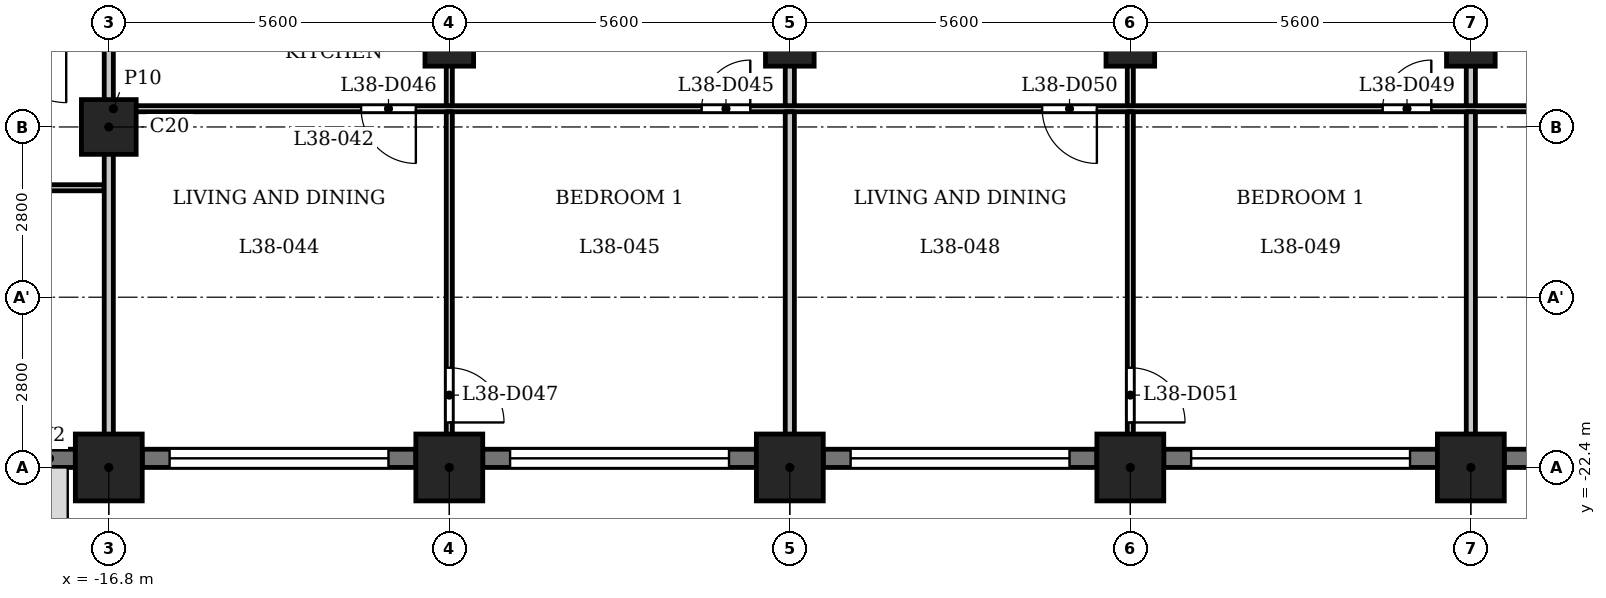
"""IFC4 building model, lengths in metres.
Left out: names, types, materials, properties, quantities, classifications, styles, units other than length and angle.
Written with IfcOpenShell. Run it as: python <this file> out.ifc"""

import sys

from ifc_helpers import new_model, si_unit, direction, frame, frame_2d, origin, origin_2d, place, context, subcontext, project, spatial, rectangle, extrude, element, fill, save


model = new_model("IFC4")
c1 = context("Model", 3, precision=1e-05, world=origin(), true_north=direction((0.0, 1.0)))
c2 = subcontext(c1, "Body", "Model", "MODEL_VIEW")
j1 = project(units=[si_unit("LENGTHUNIT", "METRE"), si_unit("PLANEANGLEUNIT", "RADIAN")], contexts=[c1])
p1 = place(None, origin())
s1 = spatial("IfcSite", under=j1, at=p1, CompositionType="ELEMENT")
p2 = place(p1, origin())
s2 = spatial("IfcBuilding", under=s1, at=p2, CompositionType="ELEMENT")
p3 = place(p2, frame((0.0, 0.0, 150.1)))
s3 = spatial("IfcBuildingStorey", under=s2, at=p3, CompositionType="ELEMENT", Elevation=150.1)
for number, where, z_axis, x_axis in (
    (1, (-16.8, -22.4, 0.0), (0.0, 0.0, 1.0), (1.0, 0.0, 0.0)),
    (2, (-11.2, -22.4, 0.0), (0.0, 0.0, 1.0), (1.0, 0.0, 0.0)),
    (3, (-5.6, -22.4, 0.0), (0.0, 0.0, 1.0), (1.0, 0.0, 0.0)),
    (4, (0.0, -22.4, 0.0), (0.0, 0.0, 1.0), (1.0, 0.0, 0.0)),
    (5, (5.6, -22.4, 0.0), (0.0, 0.0, 1.0), (1.0, 0.0, 0.0)),
):
    element("IfcColumn", number, at=place(p3, frame(where, z_axis=z_axis, x_axis=x_axis)), inside=s3, PredefinedType="COLUMN", context=c2, shape_type="SweptSolid", body=[
        extrude(rectangle(XDim=1.1, YDim=1.1, at=origin_2d()), origin(), (0.0, 0.0, 1.0), 3.5),
    ])
p4 = place(p3, frame((-16.8, -16.8, 0.0), z_axis=(0.0, 0.0, 1.0), x_axis=(1.0, 0.0, 0.0)))
e6 = element("IfcColumn", 6, at=p4, inside=s3, PredefinedType="COLUMN", context=c2, shape_type="SweptSolid", body=[
    extrude(rectangle(XDim=0.9, YDim=0.9, at=origin_2d()), origin(), (0.0, 0.0, 1.0), 3.5),
])
for number, where, z_axis, x_axis in (
    (7, (-11.2, -15.4, 0.0), (0.0, 0.0, 1.0), (1.0, 0.0, 0.0)),
    (8, (-5.6, -15.4, 0.0), (0.0, 0.0, 1.0), (1.0, 0.0, 0.0)),
    (9, (0.0, -15.4, 0.0), (0.0, 0.0, 1.0), (1.0, 0.0, 0.0)),
    (10, (5.6, -15.4, 0.0), (0.0, 0.0, 1.0), (1.0, 0.0, 0.0)),
):
    element("IfcColumn", number, at=place(p3, frame(where, z_axis=z_axis, x_axis=x_axis)), inside=s3, PredefinedType="COLUMN", context=c2, shape_type="SweptSolid", body=[
        extrude(rectangle(XDim=0.8, YDim=0.8, at=origin_2d()), origin(), (0.0, 0.0, 1.0), 3.5),
    ])
p5 = place(p3, frame((-20.0, -22.25, 0.0), z_axis=(0.0, 0.0, 1.0), x_axis=(1.0, 0.0, 0.0)))
e11 = element("IfcWall", 11, at=p5, inside=s3, PredefinedType="SOLIDWALL", context=c2, shape_type="SweptSolid", body=[
    extrude(rectangle(XDim=2.65, YDim=0.3, at=frame_2d((1.325, 0.0))), origin(), (0.0, 0.0, 1.0), 2.45),
])
p6 = place(p5, frame((0.425, 0.0, 0.9)))
e12 = element("IfcOpeningElement", 12, at=p6, cuts=e11, PredefinedType="OPENING", context=c2, shape_type="SweptSolid", body=[
    extrude(rectangle(XDim=1.8, YDim=1.25, at=frame_2d((0.9, 0.625))), frame((0.0, 0.16, 0.0), z_axis=(0.0, -1.0, 0.0), x_axis=(1.0, 0.0, 0.0)), (0.0, 0.0, 1.0), 0.32),
])
p7 = place(p3, frame((-16.25, -22.25, 0.0), z_axis=(0.0, 0.0, 1.0), x_axis=(1.0, 0.0, 0.0)))
e13 = element("IfcWall", 13, at=p7, inside=s3, PredefinedType="SOLIDWALL", context=c2, shape_type="SweptSolid", body=[
    extrude(rectangle(XDim=4.5, YDim=0.3, at=frame_2d((2.25, 0.0))), origin(), (0.0, 0.0, 1.0), 2.45),
])
p8 = place(p7, frame((0.45, 0.0, 1.2)))
e14 = element("IfcOpeningElement", 14, at=p8, cuts=e13, PredefinedType="OPENING", context=c2, shape_type="SweptSolid", body=[
    extrude(rectangle(XDim=3.6, YDim=0.95, at=frame_2d((1.8, 0.475))), frame((0.0, 0.16, 0.0), z_axis=(0.0, -1.0, 0.0), x_axis=(1.0, 0.0, 0.0)), (0.0, 0.0, 1.0), 0.32),
])
p9 = place(p3, frame((-10.65, -22.25, 0.0), z_axis=(0.0, 0.0, 1.0), x_axis=(1.0, 0.0, 0.0)))
e15 = element("IfcWall", 15, at=p9, inside=s3, PredefinedType="SOLIDWALL", context=c2, shape_type="SweptSolid", body=[
    extrude(rectangle(XDim=4.5, YDim=0.3, at=frame_2d((2.25, 0.0))), origin(), (0.0, 0.0, 1.0), 2.45),
])
p10 = place(p9, frame((0.45, 0.0, 1.2)))
e16 = element("IfcOpeningElement", 16, at=p10, cuts=e15, PredefinedType="OPENING", context=c2, shape_type="SweptSolid", body=[
    extrude(rectangle(XDim=3.6, YDim=0.95, at=frame_2d((1.8, 0.475))), frame((0.0, 0.16, 0.0), z_axis=(0.0, -1.0, 0.0), x_axis=(1.0, 0.0, 0.0)), (0.0, 0.0, 1.0), 0.32),
])
p11 = place(p3, frame((-5.05, -22.25, 0.0), z_axis=(0.0, 0.0, 1.0), x_axis=(1.0, 0.0, 0.0)))
e17 = element("IfcWall", 17, at=p11, inside=s3, PredefinedType="SOLIDWALL", context=c2, shape_type="SweptSolid", body=[
    extrude(rectangle(XDim=4.5, YDim=0.3, at=frame_2d((2.25, 0.0))), origin(), (0.0, 0.0, 1.0), 2.45),
])
p12 = place(p11, frame((0.45, 0.0, 1.2)))
e18 = element("IfcOpeningElement", 18, at=p12, cuts=e17, PredefinedType="OPENING", context=c2, shape_type="SweptSolid", body=[
    extrude(rectangle(XDim=3.6, YDim=0.95, at=frame_2d((1.8, 0.475))), frame((0.0, 0.16, 0.0), z_axis=(0.0, -1.0, 0.0), x_axis=(1.0, 0.0, 0.0)), (0.0, 0.0, 1.0), 0.32),
])
p13 = place(p3, frame((0.55, -22.25, 0.0), z_axis=(0.0, 0.0, 1.0), x_axis=(1.0, 0.0, 0.0)))
e19 = element("IfcWall", 19, at=p13, inside=s3, PredefinedType="SOLIDWALL", context=c2, shape_type="SweptSolid", body=[
    extrude(rectangle(XDim=4.5, YDim=0.3, at=frame_2d((2.25, 0.0))), origin(), (0.0, 0.0, 1.0), 2.45),
])
p14 = place(p13, frame((0.45, 0.0, 1.2)))
e20 = element("IfcOpeningElement", 20, at=p14, cuts=e19, PredefinedType="OPENING", context=c2, shape_type="SweptSolid", body=[
    extrude(rectangle(XDim=3.6, YDim=0.95, at=frame_2d((1.8, 0.475))), frame((0.0, 0.16, 0.0), z_axis=(0.0, -1.0, 0.0), x_axis=(1.0, 0.0, 0.0)), (0.0, 0.0, 1.0), 0.32),
])
p15 = place(p3, frame((6.15, -22.25, 0.0), z_axis=(0.0, 0.0, 1.0), x_axis=(1.0, 0.0, 0.0)))
e21 = element("IfcWall", 21, at=p15, inside=s3, PredefinedType="SOLIDWALL", context=c2, shape_type="SweptSolid", body=[
    extrude(rectangle(XDim=4.5, YDim=0.3, at=frame_2d((2.25, 0.0))), origin(), (0.0, 0.0, 1.0), 2.45),
])
p16 = place(p15, frame((0.45, 0.0, 1.2)))
e22 = element("IfcOpeningElement", 22, at=p16, cuts=e21, PredefinedType="OPENING", context=c2, shape_type="SweptSolid", body=[
    extrude(rectangle(XDim=3.6, YDim=0.95, at=frame_2d((1.8, 0.475))), frame((0.0, 0.16, 0.0), z_axis=(0.0, -1.0, 0.0), x_axis=(1.0, 0.0, 0.0)), (0.0, 0.0, 1.0), 0.32),
])
p17 = place(p3, frame((-26.394, -17.8, 0.0), z_axis=(0.0, 0.0, 1.0), x_axis=(1.0, 0.0, 0.0)))
e23 = element("IfcWall", 23, at=p17, inside=s3, PredefinedType="PARTITIONING", context=c2, shape_type="SweptSolid", body=[
    extrude(rectangle(XDim=9.519, YDim=0.1, at=frame_2d((4.76, 0.0))), origin(), (0.0, 0.0, 1.0), 3.2),
])
p18 = place(p17, frame((2.544, 0.0, 0.0)))
e24 = element("IfcOpeningElement", 24, at=p18, cuts=e23, PredefinedType="OPENING", context=c2, shape_type="SweptSolid", body=[
    extrude(rectangle(XDim=0.8, YDim=2.1, at=frame_2d((0.4, 1.05))), frame((0.0, 0.06, 0.0), z_axis=(0.0, -1.0, 0.0), x_axis=(1.0, 0.0, 0.0)), (0.0, 0.0, 1.0), 0.12),
])
p19 = place(p17, frame((6.894, 0.0, 0.0)))
e25 = element("IfcOpeningElement", 25, at=p19, cuts=e23, PredefinedType="OPENING", context=c2, shape_type="SweptSolid", body=[
    extrude(rectangle(XDim=0.9, YDim=2.1, at=frame_2d((0.45, 1.05))), frame((0.0, 0.06, 0.0), z_axis=(0.0, -1.0, 0.0), x_axis=(1.0, 0.0, 0.0)), (0.0, 0.0, 1.0), 0.12),
])
p20 = place(p3, frame((-16.725, -16.5, 0.0), z_axis=(0.0, 0.0, 1.0), x_axis=(1.0, 0.0, 0.0)))
e26 = element("IfcWall", 26, at=p20, inside=s3, PredefinedType="PARTITIONING", context=c2, shape_type="SweptSolid", body=[
    extrude(rectangle(XDim=33.45, YDim=0.1, at=frame_2d((16.725, 0.0))), origin(), (0.0, 0.0, 1.0), 3.2),
])
p21 = place(p20, frame((9.675, 0.0, 0.0)))
e27 = element("IfcOpeningElement", 27, at=p21, cuts=e26, PredefinedType="OPENING", context=c2, shape_type="SweptSolid", body=[
    extrude(rectangle(XDim=0.8, YDim=2.1, at=frame_2d((0.4, 1.05))), frame((0.0, 0.06, 0.0), z_axis=(0.0, -1.0, 0.0), x_axis=(1.0, 0.0, 0.0)), (0.0, 0.0, 1.0), 0.12),
])
p22 = place(p20, frame((4.075, 0.0, 0.0)))
e28 = element("IfcOpeningElement", 28, at=p22, cuts=e26, PredefinedType="OPENING", context=c2, shape_type="SweptSolid", body=[
    extrude(rectangle(XDim=0.9, YDim=2.1, at=frame_2d((0.45, 1.05))), frame((0.0, 0.06, 0.0), z_axis=(0.0, -1.0, 0.0), x_axis=(1.0, 0.0, 0.0)), (0.0, 0.0, 1.0), 0.12),
])
p23 = place(p20, frame((20.875, 0.0, 0.0)))
e29 = element("IfcOpeningElement", 29, at=p23, cuts=e26, PredefinedType="OPENING", context=c2, shape_type="SweptSolid", body=[
    extrude(rectangle(XDim=0.8, YDim=2.1, at=frame_2d((0.4, 1.05))), frame((0.0, 0.06, 0.0), z_axis=(0.0, -1.0, 0.0), x_axis=(1.0, 0.0, 0.0)), (0.0, 0.0, 1.0), 0.12),
])
p24 = place(p20, frame((15.275, 0.0, 0.0)))
e30 = element("IfcOpeningElement", 30, at=p24, cuts=e26, PredefinedType="OPENING", context=c2, shape_type="SweptSolid", body=[
    extrude(rectangle(XDim=0.9, YDim=2.1, at=frame_2d((0.45, 1.05))), frame((0.0, 0.06, 0.0), z_axis=(0.0, -1.0, 0.0), x_axis=(1.0, 0.0, 0.0)), (0.0, 0.0, 1.0), 0.12),
])
p25 = place(p20, frame((26.475, 0.0, 0.0)))
e31 = element("IfcOpeningElement", 31, at=p25, cuts=e26, PredefinedType="OPENING", context=c2, shape_type="SweptSolid", body=[
    extrude(rectangle(XDim=0.8, YDim=2.1, at=frame_2d((0.4, 1.05))), frame((0.0, 0.06, 0.0), z_axis=(0.0, -1.0, 0.0), x_axis=(1.0, 0.0, 0.0)), (0.0, 0.0, 1.0), 0.12),
])
p26 = place(p20, frame((30.575, 0.0, 0.0)))
e32 = element("IfcOpeningElement", 32, at=p26, cuts=e26, PredefinedType="OPENING", context=c2, shape_type="SweptSolid", body=[
    extrude(rectangle(XDim=0.9, YDim=2.1, at=frame_2d((0.45, 1.05))), frame((0.0, 0.06, 0.0), z_axis=(0.0, -1.0, 0.0), x_axis=(1.0, 0.0, 0.0)), (0.0, 0.0, 1.0), 0.12),
])
p27 = place(p3, frame((-16.8, -22.93, 0.0), z_axis=(0.0, 0.0, 1.0), x_axis=(0.0, 1.0, 0.0)))
e33 = element("IfcWall", 33, at=p27, inside=s3, PredefinedType="PARTITIONING", context=c2, shape_type="SweptSolid", body=[
    extrude(rectangle(XDim=7.455, YDim=0.15, at=frame_2d((3.728, 0.0))), origin(), (0.0, 0.0, 1.0), 3.2),
])
p28 = place(p3, frame((-11.2, -22.93, 0.0), z_axis=(0.0, 0.0, 1.0), x_axis=(0.0, 1.0, 0.0)))
e34 = element("IfcWall", 34, at=p28, inside=s3, PredefinedType="PARTITIONING", context=c2, shape_type="SweptSolid", body=[
    extrude(rectangle(XDim=6.38, YDim=0.1, at=frame_2d((3.19, 0.0))), origin(), (0.0, 0.0, 1.0), 3.2),
])
p29 = place(p28, frame((1.27, 0.0, 0.0)))
e35 = element("IfcOpeningElement", 35, at=p29, cuts=e34, PredefinedType="OPENING", context=c2, shape_type="SweptSolid", body=[
    extrude(rectangle(XDim=0.9, YDim=2.1, at=frame_2d((0.45, 1.05))), frame((0.0, 0.06, 0.0), z_axis=(0.0, -1.0, 0.0), x_axis=(1.0, 0.0, 0.0)), (0.0, 0.0, 1.0), 0.12),
])
p30 = place(p3, frame((-11.2, -16.45, 0.0), z_axis=(0.0, 0.0, 1.0), x_axis=(0.0, 1.0, 0.0)))
e36 = element("IfcWall", 36, at=p30, inside=s3, PredefinedType="PARTITIONING", context=c2, shape_type="SweptSolid", body=[
    extrude(rectangle(XDim=3.175, YDim=0.1, at=frame_2d((1.587, 0.0))), origin(), (0.0, 0.0, 1.0), 3.2),
])
p31 = place(p3, frame((-5.6, -22.93, 0.0), z_axis=(0.0, 0.0, 1.0), x_axis=(0.0, 1.0, 0.0)))
e37 = element("IfcWall", 37, at=p31, inside=s3, PredefinedType="PARTITIONING", context=c2, shape_type="SweptSolid", body=[
    extrude(rectangle(XDim=6.38, YDim=0.15, at=frame_2d((3.19, 0.0))), origin(), (0.0, 0.0, 1.0), 3.2),
])
p32 = place(p3, frame((-5.6, -16.45, 0.0), z_axis=(0.0, 0.0, 1.0), x_axis=(0.0, 1.0, 0.0)))
e38 = element("IfcWall", 38, at=p32, inside=s3, PredefinedType="PARTITIONING", context=c2, shape_type="SweptSolid", body=[
    extrude(rectangle(XDim=3.175, YDim=0.15, at=frame_2d((1.587, 0.0))), origin(), (0.0, 0.0, 1.0), 3.2),
])
p33 = place(p3, frame((0.0, -22.93, 0.0), z_axis=(0.0, 0.0, 1.0), x_axis=(0.0, 1.0, 0.0)))
e39 = element("IfcWall", 39, at=p33, inside=s3, PredefinedType="PARTITIONING", context=c2, shape_type="SweptSolid", body=[
    extrude(rectangle(XDim=6.38, YDim=0.1, at=frame_2d((3.19, 0.0))), origin(), (0.0, 0.0, 1.0), 3.2),
])
p34 = place(p33, frame((1.27, 0.0, 0.0)))
e40 = element("IfcOpeningElement", 40, at=p34, cuts=e39, PredefinedType="OPENING", context=c2, shape_type="SweptSolid", body=[
    extrude(rectangle(XDim=0.9, YDim=2.1, at=frame_2d((0.45, 1.05))), frame((0.0, 0.06, 0.0), z_axis=(0.0, -1.0, 0.0), x_axis=(1.0, 0.0, 0.0)), (0.0, 0.0, 1.0), 0.12),
])
p35 = place(p3, frame((0.0, -16.45, 0.0), z_axis=(0.0, 0.0, 1.0), x_axis=(0.0, 1.0, 0.0)))
e41 = element("IfcWall", 41, at=p35, inside=s3, PredefinedType="PARTITIONING", context=c2, shape_type="SweptSolid", body=[
    extrude(rectangle(XDim=3.175, YDim=0.1, at=frame_2d((1.587, 0.0))), origin(), (0.0, 0.0, 1.0), 3.2),
])
p36 = place(p3, frame((5.6, -22.93, 0.0), z_axis=(0.0, 0.0, 1.0), x_axis=(0.0, 1.0, 0.0)))
e42 = element("IfcWall", 42, at=p36, inside=s3, PredefinedType="PARTITIONING", context=c2, shape_type="SweptSolid", body=[
    extrude(rectangle(XDim=6.38, YDim=0.15, at=frame_2d((3.19, 0.0))), origin(), (0.0, 0.0, 1.0), 3.2),
])
p37 = place(p3, frame((5.6, -16.45, 0.0), z_axis=(0.0, 0.0, 1.0), x_axis=(0.0, 1.0, 0.0)))
e43 = element("IfcWall", 43, at=p37, inside=s3, PredefinedType="PARTITIONING", context=c2, shape_type="SweptSolid", body=[
    extrude(rectangle(XDim=3.175, YDim=0.15, at=frame_2d((1.587, 0.0))), origin(), (0.0, 0.0, 1.0), 3.2),
])
p38 = place(p21, origin())
e44 = element("IfcDoor", 44, at=p38, inside=s3, OperationType="SINGLE_SWING_LEFT", PredefinedType="DOOR", context=c2, shape_type="SweptSolid", body=[
    extrude(rectangle(XDim=0.8, YDim=2.1, at=frame_2d((0.4, 1.05))), frame((0.0, 0.025, 0.0), z_axis=(0.0, -1.0, 0.0), x_axis=(1.0, 0.0, 0.0)), (0.0, 0.0, 1.0), 0.05),
])
fill(e27, e44)
p39 = place(p22, origin())
e45 = element("IfcDoor", 45, at=p39, inside=s3, OperationType="SINGLE_SWING_RIGHT", PredefinedType="DOOR", context=c2, shape_type="SweptSolid", body=[
    extrude(rectangle(XDim=0.9, YDim=2.1, at=frame_2d((0.45, 1.05))), frame((0.0, 0.025, 0.0), z_axis=(0.0, -1.0, 0.0), x_axis=(1.0, 0.0, 0.0)), (0.0, 0.0, 1.0), 0.05),
])
fill(e28, e45)
p40 = place(p29, origin())
e46 = element("IfcDoor", 46, at=p40, inside=s3, OperationType="SINGLE_SWING_LEFT", PredefinedType="DOOR", context=c2, shape_type="SweptSolid", body=[
    extrude(rectangle(XDim=0.9, YDim=2.1, at=frame_2d((0.45, 1.05))), frame((0.0, 0.025, 0.0), z_axis=(0.0, -1.0, 0.0), x_axis=(1.0, 0.0, 0.0)), (0.0, 0.0, 1.0), 0.05),
])
fill(e35, e46)
p41 = place(p23, origin())
e47 = element("IfcDoor", 47, at=p41, inside=s3, OperationType="SINGLE_SWING_LEFT", PredefinedType="DOOR", context=c2, shape_type="SweptSolid", body=[
    extrude(rectangle(XDim=0.8, YDim=2.1, at=frame_2d((0.4, 1.05))), frame((0.0, 0.025, 0.0), z_axis=(0.0, -1.0, 0.0), x_axis=(1.0, 0.0, 0.0)), (0.0, 0.0, 1.0), 0.05),
])
fill(e29, e47)
p42 = place(p24, origin())
e48 = element("IfcDoor", 48, at=p42, inside=s3, OperationType="SINGLE_SWING_RIGHT", PredefinedType="DOOR", context=c2, shape_type="SweptSolid", body=[
    extrude(rectangle(XDim=0.9, YDim=2.1, at=frame_2d((0.45, 1.05))), frame((0.0, 0.025, 0.0), z_axis=(0.0, -1.0, 0.0), x_axis=(1.0, 0.0, 0.0)), (0.0, 0.0, 1.0), 0.05),
])
fill(e30, e48)
p43 = place(p34, origin())
e49 = element("IfcDoor", 49, at=p43, inside=s3, OperationType="SINGLE_SWING_LEFT", PredefinedType="DOOR", context=c2, shape_type="SweptSolid", body=[
    extrude(rectangle(XDim=0.9, YDim=2.1, at=frame_2d((0.45, 1.05))), frame((0.0, 0.025, 0.0), z_axis=(0.0, -1.0, 0.0), x_axis=(1.0, 0.0, 0.0)), (0.0, 0.0, 1.0), 0.05),
])
fill(e40, e49)
p44 = place(p8, origin())
e50 = element("IfcWindow", 50, at=p44, inside=s3, PartitioningType="SINGLE_PANEL", PredefinedType="WINDOW", context=c2, shape_type="SweptSolid", body=[
    extrude(rectangle(XDim=3.6, YDim=0.95, at=frame_2d((1.8, 0.475))), frame((0.0, 0.03, 0.0), z_axis=(0.0, -1.0, 0.0), x_axis=(1.0, 0.0, 0.0)), (0.0, 0.0, 1.0), 0.06),
])
fill(e14, e50)
p45 = place(p10, origin())
e51 = element("IfcWindow", 51, at=p45, inside=s3, PartitioningType="SINGLE_PANEL", PredefinedType="WINDOW", context=c2, shape_type="SweptSolid", body=[
    extrude(rectangle(XDim=3.6, YDim=0.95, at=frame_2d((1.8, 0.475))), frame((0.0, 0.03, 0.0), z_axis=(0.0, -1.0, 0.0), x_axis=(1.0, 0.0, 0.0)), (0.0, 0.0, 1.0), 0.06),
])
fill(e16, e51)
p46 = place(p12, origin())
e52 = element("IfcWindow", 52, at=p46, inside=s3, PartitioningType="SINGLE_PANEL", PredefinedType="WINDOW", context=c2, shape_type="SweptSolid", body=[
    extrude(rectangle(XDim=3.6, YDim=0.95, at=frame_2d((1.8, 0.475))), frame((0.0, 0.03, 0.0), z_axis=(0.0, -1.0, 0.0), x_axis=(1.0, 0.0, 0.0)), (0.0, 0.0, 1.0), 0.06),
])
fill(e18, e52)
p47 = place(p14, origin())
e53 = element("IfcWindow", 53, at=p47, inside=s3, PartitioningType="SINGLE_PANEL", PredefinedType="WINDOW", context=c2, shape_type="SweptSolid", body=[
    extrude(rectangle(XDim=3.6, YDim=0.95, at=frame_2d((1.8, 0.475))), frame((0.0, 0.03, 0.0), z_axis=(0.0, -1.0, 0.0), x_axis=(1.0, 0.0, 0.0)), (0.0, 0.0, 1.0), 0.06),
])
fill(e20, e53)
save(model, sys.argv[1])
